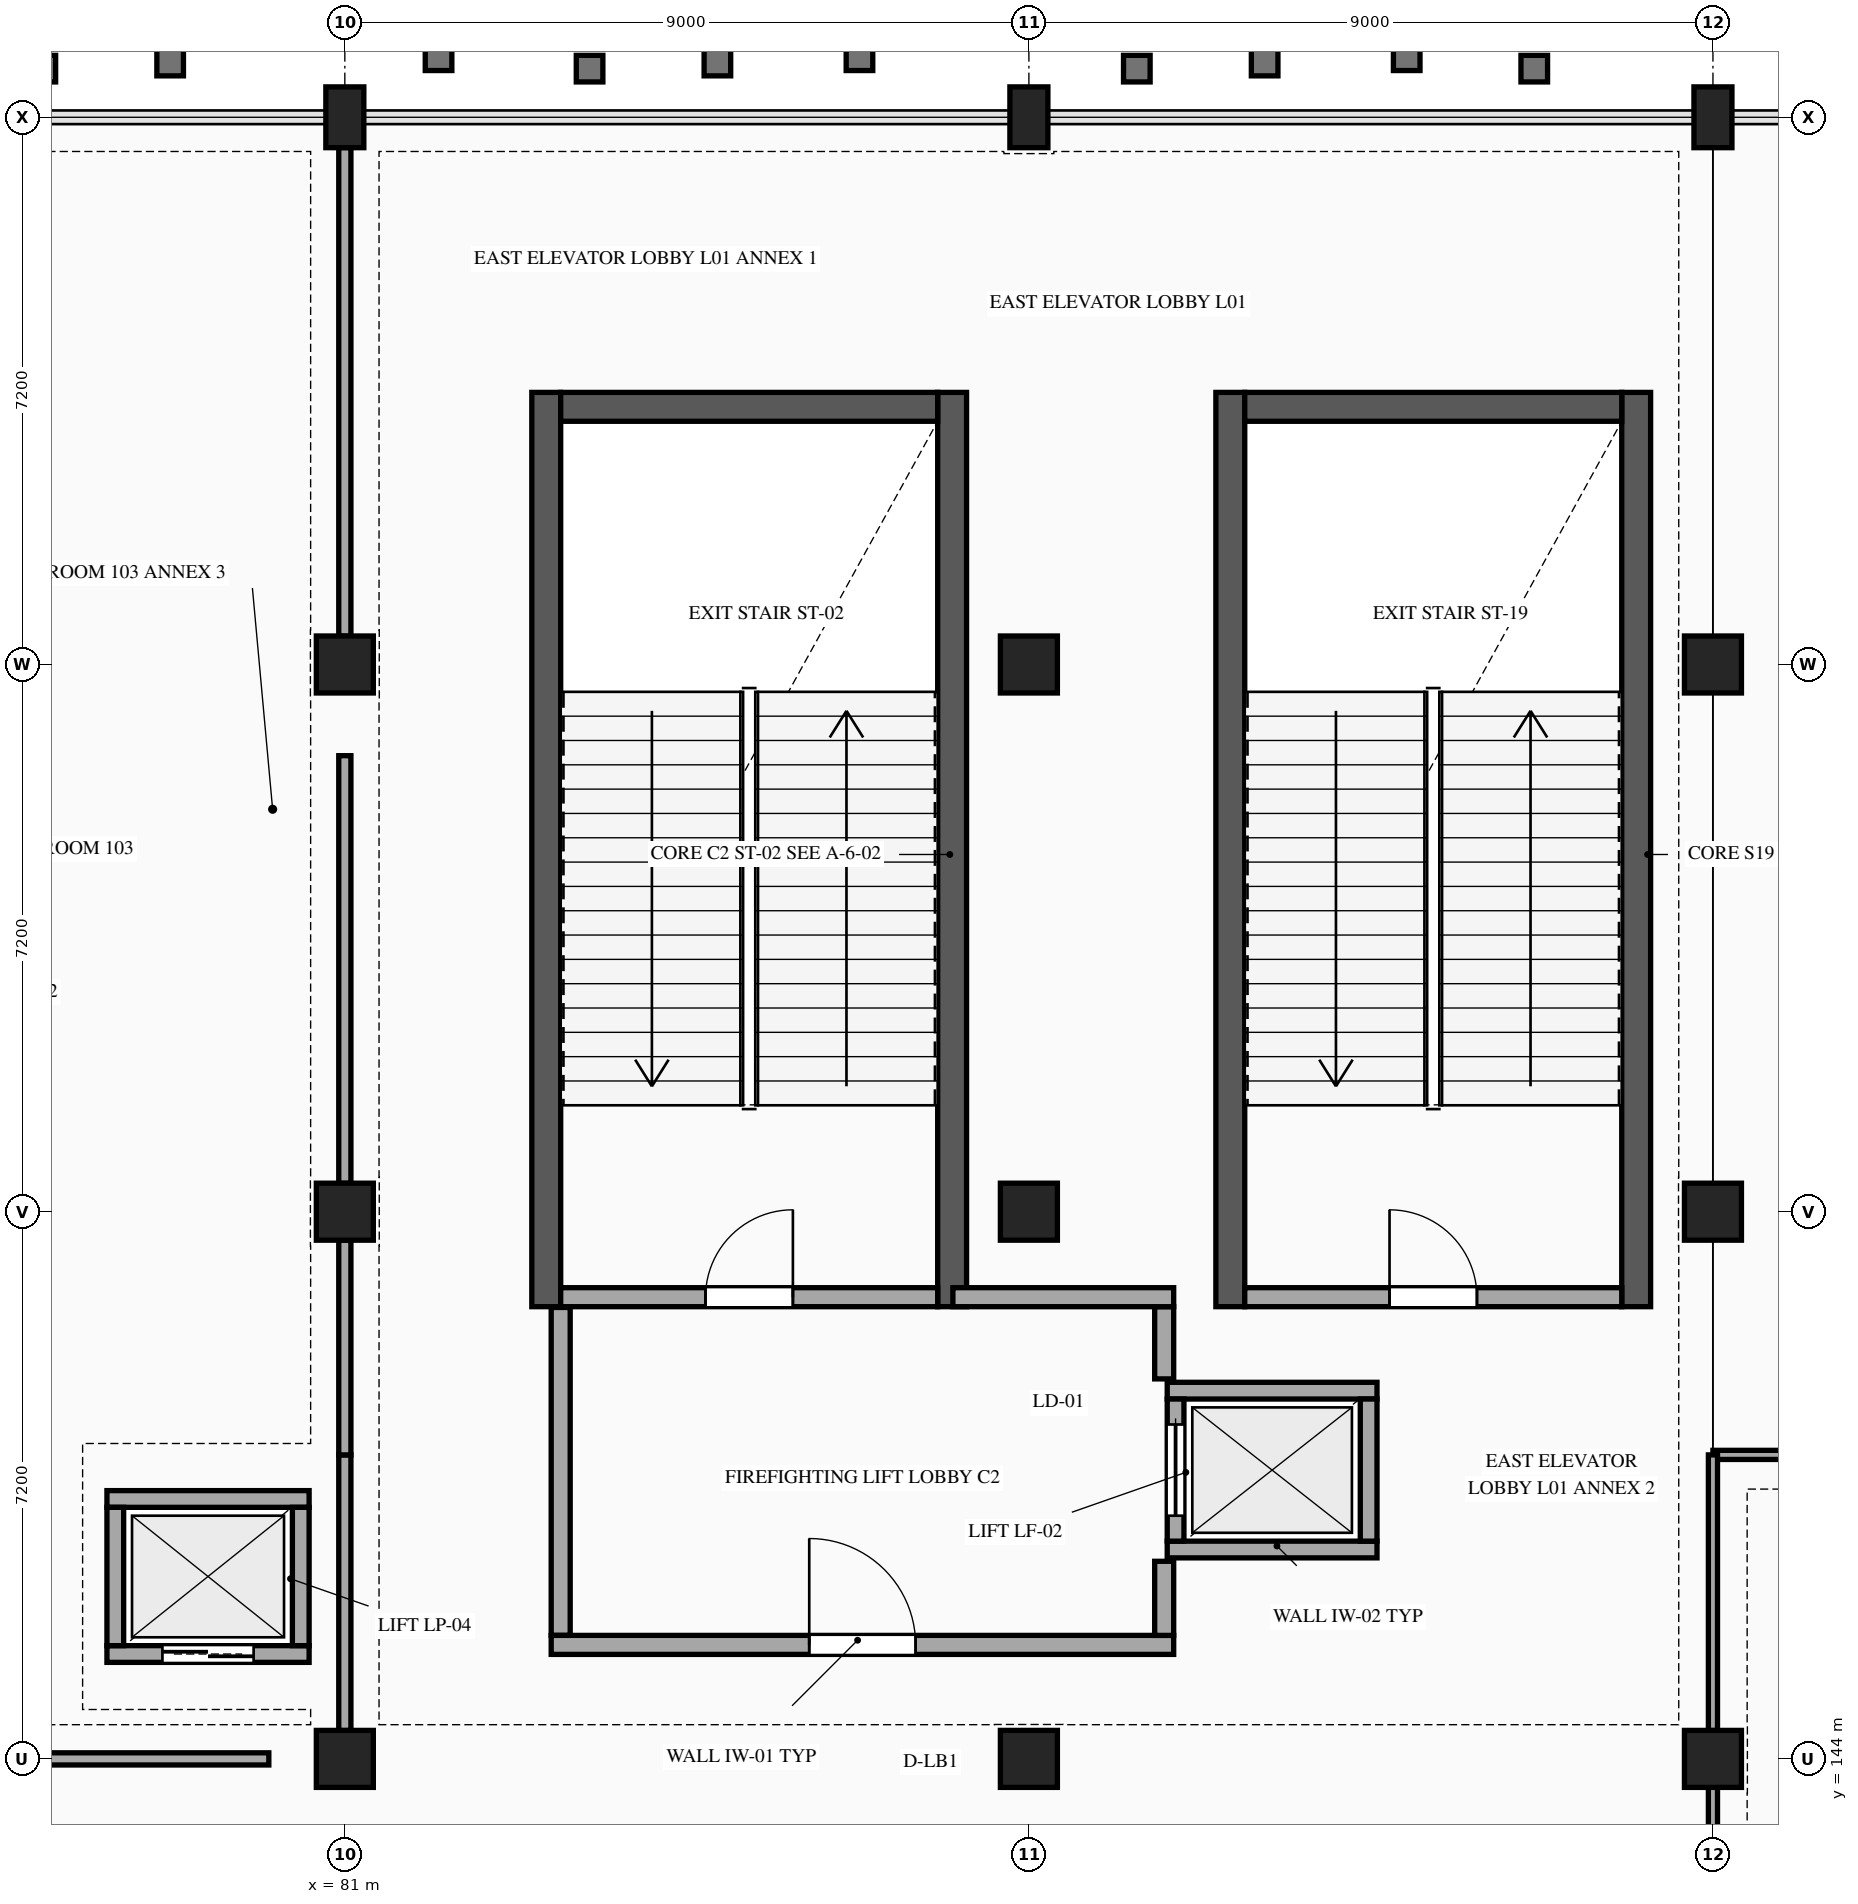
"""IFC4 building model, lengths in metres.
Left out: names, types, materials, properties, quantities, classifications, styles, units other than length and angle.
Written with IfcOpenShell. Run it as: python <this file> out.ifc"""

import sys

from ifc_helpers import new_model, si_unit, direction, frame, frame_2d, origin, origin_2d, place, context, subcontext, project, spatial, rectangle, extrude, element, fill, save


model = new_model("IFC4")
c1 = context("Model", 3, precision=1e-05, world=origin(), true_north=direction((0.0, 1.0)))
c2 = subcontext(c1, "Body", "Model", "MODEL_VIEW")
j1 = project(units=[si_unit("LENGTHUNIT", "METRE"), si_unit("PLANEANGLEUNIT", "RADIAN")], contexts=[c1])
p1 = place(None, origin())
s1 = spatial("IfcSite", under=j1, at=p1, CompositionType="ELEMENT")
p2 = place(p1, origin())
s2 = spatial("IfcBuilding", under=s1, at=p2, CompositionType="ELEMENT")
p3 = place(p2, frame((0.0, 0.0, 5.4)))
s3 = spatial("IfcBuildingStorey", under=s2, at=p3, CompositionType="ELEMENT", Elevation=5.4)
for number, where, z_axis, x_axis in (
    (1, (81.0, 144.0, 0.0), (0.0, 0.0, 1.0), (1.0, 0.0, 0.0)),
    (2, (81.0, 151.2, 0.0), (0.0, 0.0, 1.0), (1.0, 0.0, 0.0)),
    (3, (81.0, 158.4, 0.0), (0.0, 0.0, 1.0), (1.0, 0.0, 0.0)),
):
    element("IfcColumn", number, at=place(p3, frame(where, z_axis=z_axis, x_axis=x_axis)), inside=s3, PredefinedType="COLUMN", context=c2, shape_type="SweptSolid", body=[
        extrude(rectangle(XDim=0.75, YDim=0.75, at=origin_2d()), origin(), (0.0, 0.0, 1.0), 5.4),
    ])
p4 = place(p3, frame((81.0, 165.6, 0.0), z_axis=(0.0, 0.0, 1.0), x_axis=(1.0, 0.0, 0.0)))
e4 = element("IfcColumn", 4, at=p4, inside=s3, PredefinedType="COLUMN", context=c2, shape_type="SweptSolid", body=[
    extrude(rectangle(XDim=0.5, YDim=0.8, at=origin_2d()), origin(), (0.0, 0.0, 1.0), 5.4),
])
for number, where, z_axis, x_axis in (
    (5, (90.0, 144.0, 0.0), (0.0, 0.0, 1.0), (1.0, 0.0, 0.0)),
    (6, (90.0, 151.2, 0.0), (0.0, 0.0, 1.0), (1.0, 0.0, 0.0)),
    (7, (90.0, 158.4, 0.0), (0.0, 0.0, 1.0), (1.0, 0.0, 0.0)),
):
    element("IfcColumn", number, at=place(p3, frame(where, z_axis=z_axis, x_axis=x_axis)), inside=s3, PredefinedType="COLUMN", context=c2, shape_type="SweptSolid", body=[
        extrude(rectangle(XDim=0.75, YDim=0.75, at=origin_2d()), origin(), (0.0, 0.0, 1.0), 5.4),
    ])
p5 = place(p3, frame((90.0, 165.6, 0.0), z_axis=(0.0, 0.0, 1.0), x_axis=(1.0, 0.0, 0.0)))
e8 = element("IfcColumn", 8, at=p5, inside=s3, PredefinedType="COLUMN", context=c2, shape_type="SweptSolid", body=[
    extrude(rectangle(XDim=0.5, YDim=0.8, at=origin_2d()), origin(), (0.0, 0.0, 1.0), 5.4),
])
for number, where, z_axis, x_axis in (
    (9, (99.0, 144.0, 0.0), (0.0, 0.0, 1.0), (1.0, 0.0, 0.0)),
    (10, (99.0, 151.2, 0.0), (0.0, 0.0, 1.0), (1.0, 0.0, 0.0)),
    (11, (99.0, 158.4, 0.0), (0.0, 0.0, 1.0), (1.0, 0.0, 0.0)),
):
    element("IfcColumn", number, at=place(p3, frame(where, z_axis=z_axis, x_axis=x_axis)), inside=s3, PredefinedType="COLUMN", context=c2, shape_type="SweptSolid", body=[
        extrude(rectangle(XDim=0.75, YDim=0.75, at=origin_2d()), origin(), (0.0, 0.0, 1.0), 5.4),
    ])
p6 = place(p3, frame((99.0, 165.6, 0.0), z_axis=(0.0, 0.0, 1.0), x_axis=(1.0, 0.0, 0.0)))
e12 = element("IfcColumn", 12, at=p6, inside=s3, PredefinedType="COLUMN", context=c2, shape_type="SweptSolid", body=[
    extrude(rectangle(XDim=0.5, YDim=0.8, at=origin_2d()), origin(), (0.0, 0.0, 1.0), 5.4),
])
for number, where, z_axis, x_axis in (
    (13, (83.65, 149.95, 0.0), (0.0, 0.0, 1.0), (0.0, 1.0, 0.0)),
    (14, (88.99, 161.98, 0.0), (0.0, 0.0, 1.0), (0.0, -1.0, 0.0)),
):
    element("IfcWall", number, at=place(p3, frame(where, z_axis=z_axis, x_axis=x_axis)), inside=s3, PredefinedType="SHEAR", context=c2, shape_type="SweptSolid", body=[
        extrude(rectangle(XDim=12.03, YDim=0.38, at=frame_2d((6.015, 0.0))), origin(), (0.0, 0.0, 1.0), 5.12),
    ])
p7 = place(p3, frame((83.84, 161.79, 0.0), z_axis=(0.0, 0.0, 1.0), x_axis=(1.0, 0.0, 0.0)))
e15 = element("IfcWall", 15, at=p7, inside=s3, PredefinedType="SHEAR", context=c2, shape_type="SweptSolid", body=[
    extrude(rectangle(XDim=4.96, YDim=0.38, at=frame_2d((2.48, 0.0))), origin(), (0.0, 0.0, 1.0), 5.12),
])
for number, where, z_axis, x_axis in (
    (16, (92.65, 149.95, 0.0), (0.0, 0.0, 1.0), (0.0, 1.0, 0.0)),
    (17, (97.99, 161.98, 0.0), (0.0, 0.0, 1.0), (0.0, -1.0, 0.0)),
):
    element("IfcWall", number, at=place(p3, frame(where, z_axis=z_axis, x_axis=x_axis)), inside=s3, PredefinedType="SHEAR", context=c2, shape_type="SweptSolid", body=[
        extrude(rectangle(XDim=12.03, YDim=0.38, at=frame_2d((6.015, 0.0))), origin(), (0.0, 0.0, 1.0), 5.12),
    ])
p8 = place(p3, frame((92.84, 161.79, 0.0), z_axis=(0.0, 0.0, 1.0), x_axis=(1.0, 0.0, 0.0)))
e18 = element("IfcWall", 18, at=p8, inside=s3, PredefinedType="SHEAR", context=c2, shape_type="SweptSolid", body=[
    extrude(rectangle(XDim=4.96, YDim=0.38, at=frame_2d((2.48, 0.0))), origin(), (0.0, 0.0, 1.0), 5.12),
])
p9 = place(p3, frame((83.84, 150.075, 0.0), z_axis=(0.0, 0.0, 1.0), x_axis=(1.0, 0.0, 0.0)))
e19 = element("IfcWall", 19, at=p9, inside=s3, PredefinedType="STANDARD", context=c2, shape_type="SweptSolid", body=[
    extrude(rectangle(XDim=4.96, YDim=0.25, at=frame_2d((2.48, 0.0))), origin(), (0.0, 0.0, 1.0), 5.12),
])
p10 = place(p9, frame((1.905, 0.0, 0.0)))
e20 = element("IfcOpeningElement", 20, at=p10, cuts=e19, PredefinedType="OPENING", context=c2, shape_type="SweptSolid", body=[
    extrude(rectangle(XDim=1.15, YDim=2.2, at=frame_2d((0.575, 1.1))), frame((0.0, 0.135, 0.0), z_axis=(0.0, -1.0, 0.0), x_axis=(1.0, 0.0, 0.0)), (0.0, 0.0, 1.0), 0.27),
])
for number, where, z_axis, x_axis in (
    (21, (91.82, 146.755, 0.0), (0.0, 0.0, 1.0), (1.0, 0.0, 0.0)),
    (22, (94.58, 148.845, 0.0), (0.0, 0.0, 1.0), (-1.0, 0.0, 0.0)),
):
    element("IfcWall", number, at=place(p3, frame(where, z_axis=z_axis, x_axis=x_axis)), inside=s3, PredefinedType="STANDARD", context=c2, shape_type="SweptSolid", body=[
        extrude(rectangle(XDim=2.76, YDim=0.22, at=frame_2d((1.38, 0.0))), origin(), (0.0, 0.0, 1.0), 5.12),
    ])
p11 = place(p3, frame((91.93, 148.735, 0.0), z_axis=(0.0, 0.0, 1.0), x_axis=(0.0, -1.0, 0.0)))
e23 = element("IfcWall", 23, at=p11, inside=s3, PredefinedType="STANDARD", context=c2, shape_type="SweptSolid", body=[
    extrude(rectangle(XDim=1.87, YDim=0.22, at=frame_2d((0.935, 0.0))), origin(), (0.0, 0.0, 1.0), 5.12),
])
p12 = place(p11, frame((0.335, 0.0, 0.0)))
e24 = element("IfcOpeningElement", 24, at=p12, cuts=e23, PredefinedType="OPENING", context=c2, shape_type="SweptSolid", body=[
    extrude(rectangle(XDim=1.2, YDim=2.2, at=frame_2d((0.6, 1.1))), frame((0.0, 0.12, 0.0), z_axis=(0.0, -1.0, 0.0), x_axis=(1.0, 0.0, 0.0)), (0.0, 0.0, 1.0), 0.24),
])
p13 = place(p3, frame((94.47, 146.865, 0.0), z_axis=(0.0, 0.0, 1.0), x_axis=(0.0, 1.0, 0.0)))
e25 = element("IfcWall", 25, at=p13, inside=s3, PredefinedType="STANDARD", context=c2, shape_type="SweptSolid", body=[
    extrude(rectangle(XDim=1.87, YDim=0.22, at=frame_2d((0.935, 0.0))), origin(), (0.0, 0.0, 1.0), 5.12),
])
p14 = place(p3, frame((77.87, 145.38, 0.0), z_axis=(0.0, 0.0, 1.0), x_axis=(1.0, 0.0, 0.0)))
e26 = element("IfcWall", 26, at=p14, inside=s3, PredefinedType="STANDARD", context=c2, shape_type="SweptSolid", body=[
    extrude(rectangle(XDim=2.66, YDim=0.22, at=frame_2d((1.33, 0.0))), origin(), (0.0, 0.0, 1.0), 5.12),
])
p15 = place(p14, frame((0.73, 0.0, 0.0)))
e27 = element("IfcOpeningElement", 27, at=p15, cuts=e26, PredefinedType="OPENING", context=c2, shape_type="SweptSolid", body=[
    extrude(rectangle(XDim=1.2, YDim=2.2, at=frame_2d((0.6, 1.1))), frame((0.0, 0.12, 0.0), z_axis=(0.0, -1.0, 0.0), x_axis=(1.0, 0.0, 0.0)), (0.0, 0.0, 1.0), 0.24),
])
p16 = place(p3, frame((80.53, 147.42, 0.0), z_axis=(0.0, 0.0, 1.0), x_axis=(-1.0, 0.0, 0.0)))
e28 = element("IfcWall", 28, at=p16, inside=s3, PredefinedType="STANDARD", context=c2, shape_type="SweptSolid", body=[
    extrude(rectangle(XDim=2.66, YDim=0.22, at=frame_2d((1.33, 0.0))), origin(), (0.0, 0.0, 1.0), 5.12),
])
for number, where, z_axis, x_axis in (
    (29, (77.98, 147.31, 0.0), (0.0, 0.0, 1.0), (0.0, -1.0, 0.0)),
    (30, (80.42, 145.49, 0.0), (0.0, 0.0, 1.0), (0.0, 1.0, 0.0)),
):
    element("IfcWall", number, at=place(p3, frame(where, z_axis=z_axis, x_axis=x_axis)), inside=s3, PredefinedType="STANDARD", context=c2, shape_type="SweptSolid", body=[
        extrude(rectangle(XDim=1.82, YDim=0.22, at=frame_2d((0.91, 0.0))), origin(), (0.0, 0.0, 1.0), 5.12),
    ])
p17 = place(p3, frame((92.84, 150.075, 0.0), z_axis=(0.0, 0.0, 1.0), x_axis=(1.0, 0.0, 0.0)))
e31 = element("IfcWall", 31, at=p17, inside=s3, PredefinedType="STANDARD", context=c2, shape_type="SweptSolid", body=[
    extrude(rectangle(XDim=4.96, YDim=0.25, at=frame_2d((2.48, 0.0))), origin(), (0.0, 0.0, 1.0), 5.12),
])
p18 = place(p17, frame((1.905, 0.0, 0.0)))
e32 = element("IfcOpeningElement", 32, at=p18, cuts=e31, PredefinedType="OPENING", context=c2, shape_type="SweptSolid", body=[
    extrude(rectangle(XDim=1.15, YDim=2.2, at=frame_2d((0.575, 1.1))), frame((0.0, 0.135, 0.0), z_axis=(0.0, -1.0, 0.0), x_axis=(1.0, 0.0, 0.0)), (0.0, 0.0, 1.0), 0.27),
])
p19 = place(p3, frame((83.84, 149.94, 0.0), z_axis=(0.0, 0.0, 1.0), x_axis=(0.0, -1.0, 0.0)))
e33 = element("IfcWall", 33, at=p19, inside=s3, PredefinedType="STANDARD", context=c2, shape_type="SweptSolid", body=[
    extrude(rectangle(XDim=4.315, YDim=0.25, at=frame_2d((2.157, 0.0))), origin(), (0.0, 0.0, 1.0), 4.508),
])
p20 = place(p3, frame((83.715, 145.5, 0.0), z_axis=(0.0, 0.0, 1.0), x_axis=(1.0, 0.0, 0.0)))
e34 = element("IfcWall", 34, at=p20, inside=s3, PredefinedType="STANDARD", context=c2, shape_type="SweptSolid", body=[
    extrude(rectangle(XDim=8.19, YDim=0.25, at=frame_2d((4.095, 0.0))), origin(), (0.0, 0.0, 1.0), 4.508),
])
p21 = place(p20, frame((3.395, 0.0, 0.0)))
e35 = element("IfcOpeningElement", 35, at=p21, cuts=e34, PredefinedType="OPENING", context=c2, shape_type="SweptSolid", body=[
    extrude(rectangle(XDim=1.4, YDim=2.2, at=frame_2d((0.7, 1.1))), frame((0.0, 0.135, 0.0), z_axis=(0.0, -1.0, 0.0), x_axis=(1.0, 0.0, 0.0)), (0.0, 0.0, 1.0), 0.27),
])
p22 = place(p3, frame((91.78, 145.625, 0.0), z_axis=(0.0, 0.0, 1.0), x_axis=(0.0, 1.0, 0.0)))
e36 = element("IfcWall", 36, at=p22, inside=s3, PredefinedType="STANDARD", context=c2, shape_type="SweptSolid", body=[
    extrude(rectangle(XDim=0.975, YDim=0.25, at=frame_2d((0.488, 0.0))), origin(), (0.0, 0.0, 1.0), 4.508),
])
p23 = place(p3, frame((91.78, 149.0, 0.0), z_axis=(0.0, 0.0, 1.0), x_axis=(0.0, 1.0, 0.0)))
e37 = element("IfcWall", 37, at=p23, inside=s3, PredefinedType="STANDARD", context=c2, shape_type="SweptSolid", body=[
    extrude(rectangle(XDim=0.95, YDim=0.25, at=frame_2d((0.475, 0.0))), origin(), (0.0, 0.0, 1.0), 4.508),
])
p24 = place(p3, frame((89.0, 150.075, 0.0), z_axis=(0.0, 0.0, 1.0), x_axis=(1.0, 0.0, 0.0)))
e38 = element("IfcWall", 38, at=p24, inside=s3, PredefinedType="STANDARD", context=c2, shape_type="SweptSolid", body=[
    extrude(rectangle(XDim=2.905, YDim=0.25, at=frame_2d((1.453, 0.0))), origin(), (0.0, 0.0, 1.0), 4.508),
])
p25 = place(p3, frame((76.5, 144.0, 0.0), z_axis=(0.0, 0.0, 1.0), x_axis=(1.0, 0.0, 0.0)))
e39 = element("IfcWall", 39, at=p25, inside=s3, PredefinedType="PARTITIONING", context=c2, shape_type="SweptSolid", body=[
    extrude(rectangle(XDim=3.5, YDim=0.16, at=frame_2d((1.75, 0.0))), origin(), (0.0, 0.0, 1.0), 4.498),
])
p26 = place(p3, frame((99.0, 148.0, 0.0), z_axis=(0.0, 0.0, 1.0), x_axis=(1.0, 0.0, 0.0)))
e40 = element("IfcWall", 40, at=p26, inside=s3, PredefinedType="PARTITIONING", context=c2, shape_type="SweptSolid", body=[
    extrude(rectangle(XDim=9.0, YDim=0.12, at=frame_2d((4.5, 0.0))), origin(), (0.0, 0.0, 1.0), 4.508),
])
p27 = place(p3, frame((81.0, 144.373, 0.0), z_axis=(0.0, 0.0, 1.0), x_axis=(0.0, 1.0, 0.0)))
e41 = element("IfcWall", 41, at=p27, inside=s3, PredefinedType="PARTITIONING", context=c2, shape_type="SweptSolid", body=[
    extrude(rectangle(XDim=3.627, YDim=0.16, at=frame_2d((1.813, 0.0))), origin(), (0.0, 0.0, 1.0), 4.508),
])
p28 = place(p3, frame((81.0, 148.0, 0.0), z_axis=(0.0, 0.0, 1.0), x_axis=(0.0, 1.0, 0.0)))
e42 = element("IfcWall", 42, at=p28, inside=s3, PredefinedType="PARTITIONING", context=c2, shape_type="SweptSolid", body=[
    extrude(rectangle(XDim=2.827, YDim=0.16, at=frame_2d((1.414, 0.0))), origin(), (0.0, 0.0, 1.0), 4.508),
])
p29 = place(p3, frame((81.0, 151.573, 0.0), z_axis=(0.0, 0.0, 1.0), x_axis=(0.0, 1.0, 0.0)))
e43 = element("IfcWall", 43, at=p29, inside=s3, PredefinedType="PARTITIONING", context=c2, shape_type="SweptSolid", body=[
    extrude(rectangle(XDim=5.627, YDim=0.16, at=frame_2d((2.813, 0.0))), origin(), (0.0, 0.0, 1.0), 4.508),
])
p30 = place(p3, frame((81.0, 158.773, 0.0), z_axis=(0.0, 0.0, 1.0), x_axis=(0.0, 1.0, 0.0)))
e44 = element("IfcWall", 44, at=p30, inside=s3, PredefinedType="PARTITIONING", context=c2, shape_type="SweptSolid", body=[
    extrude(rectangle(XDim=6.429, YDim=0.16, at=frame_2d((3.214, 0.0))), origin(), (0.0, 0.0, 1.0), 4.508),
])
p31 = place(p3, frame((99.0, 137.173, 0.0), z_axis=(0.0, 0.0, 1.0), x_axis=(0.0, 1.0, 0.0)))
e45 = element("IfcWall", 45, at=p31, inside=s3, PredefinedType="PARTITIONING", context=c2, shape_type="SweptSolid", body=[
    extrude(rectangle(XDim=6.454, YDim=0.12, at=frame_2d((3.227, 0.0))), origin(), (0.0, 0.0, 1.0), 4.508),
])
p32 = place(p3, frame((99.0, 144.373, 0.0), z_axis=(0.0, 0.0, 1.0), x_axis=(0.0, 1.0, 0.0)))
e46 = element("IfcWall", 46, at=p32, inside=s3, PredefinedType="PARTITIONING", context=c2, shape_type="SweptSolid", body=[
    extrude(rectangle(XDim=3.627, YDim=0.12, at=frame_2d((1.813, 0.0))), origin(), (0.0, 0.0, 1.0), 4.508),
])
p33 = place(p10, origin())
e47 = element("IfcDoor", 47, at=p33, inside=s3, OperationType="SINGLE_SWING_RIGHT", PredefinedType="DOOR", context=c2, shape_type="SweptSolid", body=[
    extrude(rectangle(XDim=1.15, YDim=2.2, at=frame_2d((0.575, 1.1))), frame((0.0, 0.025, 0.0), z_axis=(0.0, -1.0, 0.0), x_axis=(1.0, 0.0, 0.0)), (0.0, 0.0, 1.0), 0.05),
])
fill(e20, e47)
p34 = place(p12, origin())
e48 = element("IfcDoor", 48, at=p34, inside=s3, OperationType="DOUBLE_DOOR_SLIDING", PredefinedType="DOOR", context=c2, shape_type="SweptSolid", body=[
    extrude(rectangle(XDim=1.2, YDim=2.2, at=frame_2d((0.6, 1.1))), frame((0.0, 0.025, 0.0), z_axis=(0.0, -1.0, 0.0), x_axis=(1.0, 0.0, 0.0)), (0.0, 0.0, 1.0), 0.05),
])
fill(e24, e48)
p35 = place(p15, origin())
e49 = element("IfcDoor", 49, at=p35, inside=s3, OperationType="DOUBLE_DOOR_SLIDING", PredefinedType="DOOR", context=c2, shape_type="SweptSolid", body=[
    extrude(rectangle(XDim=1.2, YDim=2.2, at=frame_2d((0.6, 1.1))), frame((0.0, 0.025, 0.0), z_axis=(0.0, -1.0, 0.0), x_axis=(1.0, 0.0, 0.0)), (0.0, 0.0, 1.0), 0.05),
])
fill(e27, e49)
p36 = place(p18, origin())
e50 = element("IfcDoor", 50, at=p36, inside=s3, OperationType="SINGLE_SWING_LEFT", PredefinedType="DOOR", context=c2, shape_type="SweptSolid", body=[
    extrude(rectangle(XDim=1.15, YDim=2.2, at=frame_2d((0.575, 1.1))), frame((0.0, 0.025, 0.0), z_axis=(0.0, -1.0, 0.0), x_axis=(1.0, 0.0, 0.0)), (0.0, 0.0, 1.0), 0.05),
])
fill(e32, e50)
p37 = place(p21, origin())
e51 = element("IfcDoor", 51, at=p37, inside=s3, OperationType="SINGLE_SWING_LEFT", PredefinedType="DOOR", context=c2, shape_type="SweptSolid", body=[
    extrude(rectangle(XDim=1.4, YDim=2.2, at=frame_2d((0.7, 1.1))), frame((0.0, 0.025, 0.0), z_axis=(0.0, -1.0, 0.0), x_axis=(1.0, 0.0, 0.0)), (0.0, 0.0, 1.0), 0.05),
])
fill(e35, e51)
save(model, sys.argv[1])
